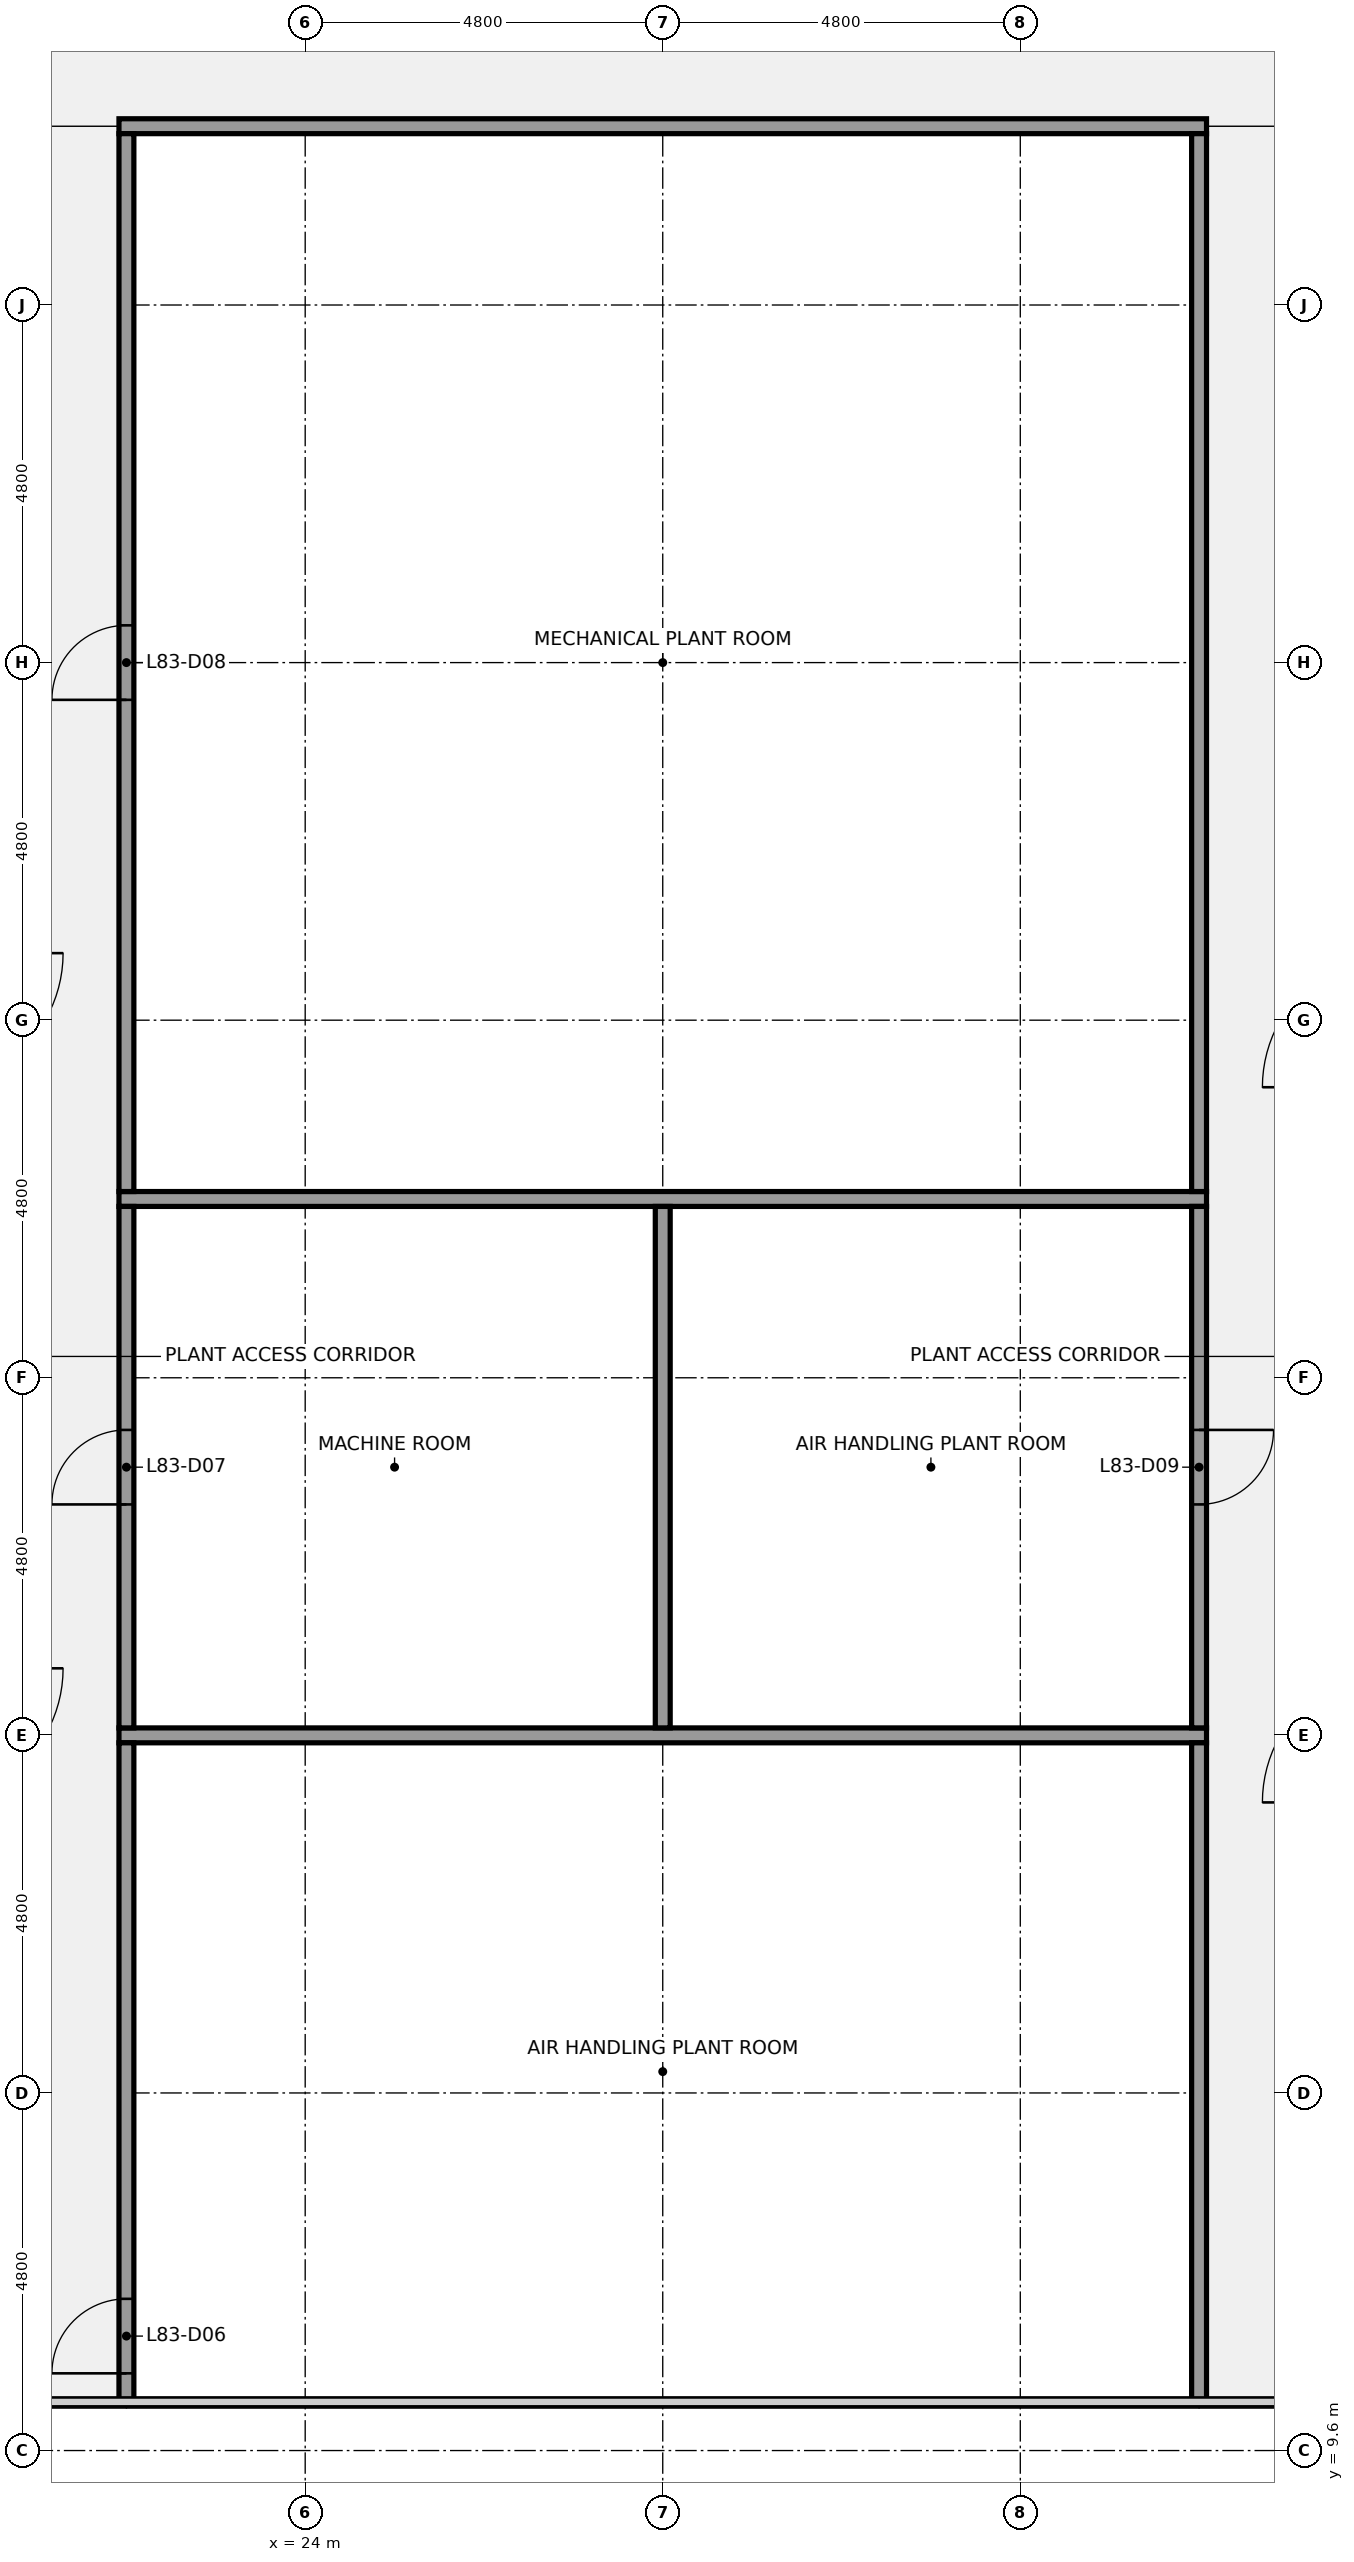
"""IFC4 building model, lengths in metres.
Left out: names, types, materials, properties, quantities, classifications, styles, units other than length and angle.
Written with IfcOpenShell. Run it as: python <this file> out.ifc"""

import sys

from ifc_helpers import new_model, si_unit, direction, frame, frame_2d, origin, place, context, subcontext, project, spatial, rectangle, extrude, element, fill, save


model = new_model("IFC4")
c1 = context("Model", 3, precision=1e-05, world=origin(), true_north=direction((0.0, 1.0)))
c2 = subcontext(c1, "Body", "Model", "MODEL_VIEW")
j1 = project(units=[si_unit("LENGTHUNIT", "METRE"), si_unit("PLANEANGLEUNIT", "RADIAN")], contexts=[c1])
p1 = place(None, origin())
s1 = spatial("IfcSite", under=j1, at=p1, CompositionType="ELEMENT")
p2 = place(p1, origin())
s2 = spatial("IfcBuilding", under=s1, at=p2, CompositionType="ELEMENT")
p3 = place(p2, frame((0.0, 0.0, 370.3)))
s3 = spatial("IfcBuildingStorey", under=s2, at=p3, CompositionType="ELEMENT", Elevation=370.3)
for number, where, z_axis, x_axis in (
    (1, (21.5, 19.2, 0.0), (0.0, 0.0, 1.0), (1.0, 0.0, 0.0)),
    (2, (21.5, 26.4, 0.0), (0.0, 0.0, 1.0), (1.0, 0.0, 0.0)),
    (3, (21.5, 40.8, 0.0), (0.0, 0.0, 1.0), (1.0, 0.0, 0.0)),
):
    element("IfcWall", number, at=place(p3, frame(where, z_axis=z_axis, x_axis=x_axis)), inside=s3, PredefinedType="PARTITIONING", context=c2, shape_type="SweptSolid", body=[
        extrude(rectangle(XDim=14.6, YDim=0.2, at=frame_2d((7.3, 0.0))), origin(), (0.0, 0.0, 1.0), 2.759),
    ])
p4 = place(p3, frame((21.6, 10.273, 0.0), z_axis=(0.0, 0.0, 1.0), x_axis=(0.0, 1.0, 0.0)))
e4 = element("IfcWall", 4, at=p4, inside=s3, PredefinedType="PARTITIONING", context=c2, shape_type="SweptSolid", body=[
    extrude(rectangle(XDim=8.827, YDim=0.2, at=frame_2d((4.414, 0.0))), origin(), (0.0, 0.0, 1.0), 2.759),
])
p5 = place(p4, frame((0.364, 0.0, 0.0)))
e5 = element("IfcOpeningElement", 5, at=p5, cuts=e4, PredefinedType="OPENING", context=c2, shape_type="SweptSolid", body=[
    extrude(rectangle(XDim=1.0, YDim=2.1, at=frame_2d((0.5, 1.05))), frame((0.0, 0.11, 0.0), z_axis=(0.0, -1.0, 0.0), x_axis=(1.0, 0.0, 0.0)), (0.0, 0.0, 1.0), 0.22),
])
p6 = place(p3, frame((21.6, 19.3, 0.0), z_axis=(0.0, 0.0, 1.0), x_axis=(0.0, 1.0, 0.0)))
e6 = element("IfcWall", 6, at=p6, inside=s3, PredefinedType="PARTITIONING", context=c2, shape_type="SweptSolid", body=[
    extrude(rectangle(XDim=7.0, YDim=0.2, at=frame_2d((3.5, 0.0))), origin(), (0.0, 0.0, 1.0), 2.759),
])
p7 = place(p6, frame((3.0, 0.0, 0.0)))
e7 = element("IfcOpeningElement", 7, at=p7, cuts=e6, PredefinedType="OPENING", context=c2, shape_type="SweptSolid", body=[
    extrude(rectangle(XDim=1.0, YDim=2.1, at=frame_2d((0.5, 1.05))), frame((0.0, 0.11, 0.0), z_axis=(0.0, -1.0, 0.0), x_axis=(1.0, 0.0, 0.0)), (0.0, 0.0, 1.0), 0.22),
])
p8 = place(p3, frame((21.6, 26.5, 0.0), z_axis=(0.0, 0.0, 1.0), x_axis=(0.0, 1.0, 0.0)))
e8 = element("IfcWall", 8, at=p8, inside=s3, PredefinedType="PARTITIONING", context=c2, shape_type="SweptSolid", body=[
    extrude(rectangle(XDim=14.2, YDim=0.2, at=frame_2d((7.1, 0.0))), origin(), (0.0, 0.0, 1.0), 2.759),
])
p9 = place(p8, frame((6.6, 0.0, 0.0)))
e9 = element("IfcOpeningElement", 9, at=p9, cuts=e8, PredefinedType="OPENING", context=c2, shape_type="SweptSolid", body=[
    extrude(rectangle(XDim=1.0, YDim=2.1, at=frame_2d((0.5, 1.05))), frame((0.0, 0.11, 0.0), z_axis=(0.0, -1.0, 0.0), x_axis=(1.0, 0.0, 0.0)), (0.0, 0.0, 1.0), 0.22),
])
p10 = place(p3, frame((28.8, 19.3, 0.0), z_axis=(0.0, 0.0, 1.0), x_axis=(0.0, 1.0, 0.0)))
e10 = element("IfcWall", 10, at=p10, inside=s3, PredefinedType="PARTITIONING", context=c2, shape_type="SweptSolid", body=[
    extrude(rectangle(XDim=7.0, YDim=0.2, at=frame_2d((3.5, 0.0))), origin(), (0.0, 0.0, 1.0), 2.759),
])
p11 = place(p3, frame((36.0, 10.273, 0.0), z_axis=(0.0, 0.0, 1.0), x_axis=(0.0, 1.0, 0.0)))
e11 = element("IfcWall", 11, at=p11, inside=s3, PredefinedType="PARTITIONING", context=c2, shape_type="SweptSolid", body=[
    extrude(rectangle(XDim=8.827, YDim=0.2, at=frame_2d((4.414, 0.0))), origin(), (0.0, 0.0, 1.0), 2.759),
])
p12 = place(p3, frame((36.0, 19.3, 0.0), z_axis=(0.0, 0.0, 1.0), x_axis=(0.0, 1.0, 0.0)))
e12 = element("IfcWall", 12, at=p12, inside=s3, PredefinedType="PARTITIONING", context=c2, shape_type="SweptSolid", body=[
    extrude(rectangle(XDim=7.0, YDim=0.2, at=frame_2d((3.5, 0.0))), origin(), (0.0, 0.0, 1.0), 2.759),
])
p13 = place(p12, frame((3.0, 0.0, 0.0)))
e13 = element("IfcOpeningElement", 13, at=p13, cuts=e12, PredefinedType="OPENING", context=c2, shape_type="SweptSolid", body=[
    extrude(rectangle(XDim=1.0, YDim=2.1, at=frame_2d((0.5, 1.05))), frame((0.0, 0.11, 0.0), z_axis=(0.0, -1.0, 0.0), x_axis=(1.0, 0.0, 0.0)), (0.0, 0.0, 1.0), 0.22),
])
p14 = place(p3, frame((36.0, 26.5, 0.0), z_axis=(0.0, 0.0, 1.0), x_axis=(0.0, 1.0, 0.0)))
e14 = element("IfcWall", 14, at=p14, inside=s3, PredefinedType="PARTITIONING", context=c2, shape_type="SweptSolid", body=[
    extrude(rectangle(XDim=14.2, YDim=0.2, at=frame_2d((7.1, 0.0))), origin(), (0.0, 0.0, 1.0), 2.759),
])
p15 = place(p5, origin())
e15 = element("IfcDoor", 15, at=p15, inside=s3, OperationType="SINGLE_SWING_LEFT", PredefinedType="DOOR", context=c2, shape_type="SweptSolid", body=[
    extrude(rectangle(XDim=1.0, YDim=2.1, at=frame_2d((0.5, 1.05))), frame((0.0, 0.025, 0.0), z_axis=(0.0, -1.0, 0.0), x_axis=(1.0, 0.0, 0.0)), (0.0, 0.0, 1.0), 0.05),
])
fill(e5, e15)
p16 = place(p7, origin())
e16 = element("IfcDoor", 16, at=p16, inside=s3, OperationType="SINGLE_SWING_LEFT", PredefinedType="DOOR", context=c2, shape_type="SweptSolid", body=[
    extrude(rectangle(XDim=1.0, YDim=2.1, at=frame_2d((0.5, 1.05))), frame((0.0, 0.025, 0.0), z_axis=(0.0, -1.0, 0.0), x_axis=(1.0, 0.0, 0.0)), (0.0, 0.0, 1.0), 0.05),
])
fill(e7, e16)
p17 = place(p9, origin())
e17 = element("IfcDoor", 17, at=p17, inside=s3, OperationType="SINGLE_SWING_LEFT", PredefinedType="DOOR", context=c2, shape_type="SweptSolid", body=[
    extrude(rectangle(XDim=1.0, YDim=2.1, at=frame_2d((0.5, 1.05))), frame((0.0, 0.025, 0.0), z_axis=(0.0, -1.0, 0.0), x_axis=(1.0, 0.0, 0.0)), (0.0, 0.0, 1.0), 0.05),
])
fill(e9, e17)
p18 = place(p13, origin())
e18 = element("IfcDoor", 18, at=p18, inside=s3, OperationType="SINGLE_SWING_RIGHT", PredefinedType="DOOR", context=c2, shape_type="SweptSolid", body=[
    extrude(rectangle(XDim=1.0, YDim=2.1, at=frame_2d((0.5, 1.05))), frame((0.0, 0.025, 0.0), z_axis=(0.0, -1.0, 0.0), x_axis=(1.0, 0.0, 0.0)), (0.0, 0.0, 1.0), 0.05),
])
fill(e13, e18)
save(model, sys.argv[1])
